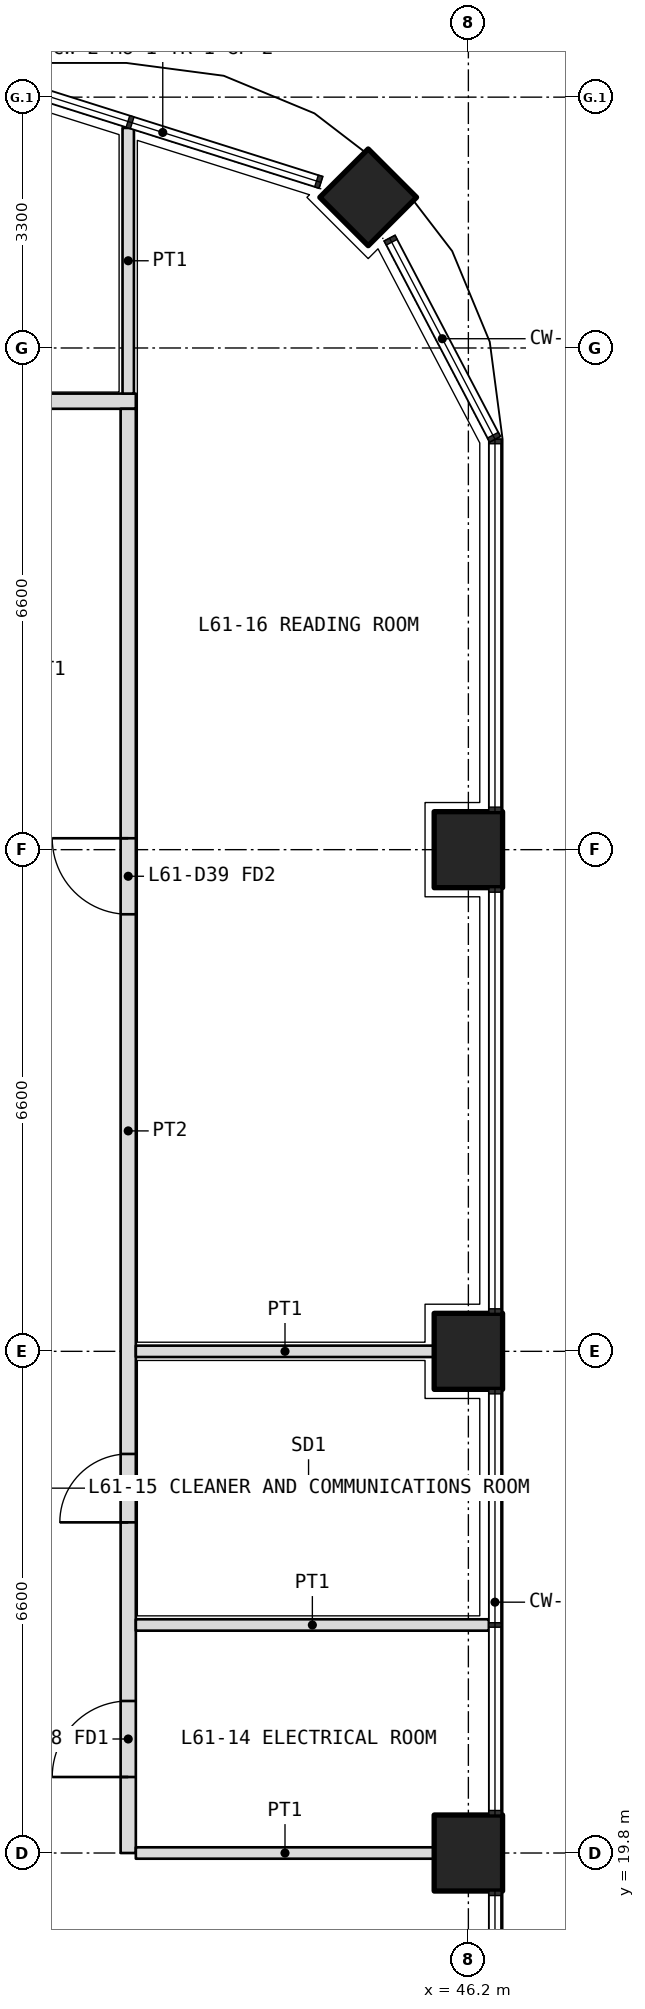
"""IFC4 building model, lengths in metres.
Left out: names, types, materials, properties, quantities, classifications, styles, units other than length and angle.
Written with IfcOpenShell. Run it as: python <this file> out.ifc"""

import sys

from ifc_helpers import new_model, si_unit, direction, frame, frame_2d, origin, origin_2d, place, context, subcontext, project, spatial, rectangle, extrude, element, fill, save


model = new_model("IFC4")
c1 = context("Model", 3, precision=1e-05, world=origin(), true_north=direction((0.0, 1.0)))
c2 = subcontext(c1, "Body", "Model", "MODEL_VIEW")
j1 = project(units=[si_unit("LENGTHUNIT", "METRE"), si_unit("PLANEANGLEUNIT", "RADIAN")], contexts=[c1])
p1 = place(None, origin())
s1 = spatial("IfcSite", under=j1, at=p1, CompositionType="ELEMENT")
p2 = place(p1, origin())
s2 = spatial("IfcBuilding", under=s1, at=p2, CompositionType="ELEMENT")
p3 = place(p2, frame((0.0, 0.0, 267.0)))
s3 = spatial("IfcBuildingStorey", under=s2, at=p3, CompositionType="ELEMENT", Elevation=267.0)
p4 = place(p3, frame((44.882, 41.582, 0.0), z_axis=(0.0, 0.0, 1.0), x_axis=(0.707106781187, 0.707106781187, 0.0)))
e1 = element("IfcColumn", 1, at=p4, inside=s3, PredefinedType="COLUMN", context=c2, shape_type="SweptSolid", body=[
    extrude(rectangle(XDim=0.9, YDim=0.9, at=origin_2d()), origin(), (0.0, 0.0, 1.0), 4.2),
])
for number, where, z_axis, x_axis in (
    (2, (46.2, 19.8, 0.0), (0.0, 0.0, 1.0), (0.0, 1.0, 0.0)),
    (3, (46.2, 26.4, 0.0), (0.0, 0.0, 1.0), (0.0, 1.0, 0.0)),
    (4, (46.2, 33.0, 0.0), (0.0, 0.0, 1.0), (0.0, 1.0, 0.0)),
):
    element("IfcColumn", number, at=place(p3, frame(where, z_axis=z_axis, x_axis=x_axis)), inside=s3, PredefinedType="COLUMN", context=c2, shape_type="SweptSolid", body=[
        extrude(rectangle(XDim=1.0, YDim=0.9, at=origin_2d()), origin(), (0.0, 0.0, 1.0), 4.2),
    ])
p5 = place(p3, frame((10.975, 38.9, 0.0), z_axis=(0.0, 0.0, 1.0), x_axis=(1.0, 0.0, 0.0)))
e5 = element("IfcWall", 5, at=p5, inside=s3, PredefinedType="PARTITIONING", context=c2, shape_type="SweptSolid", body=[
    extrude(rectangle(XDim=30.85, YDim=0.2, at=frame_2d((15.425, 0.0))), origin(), (0.0, 0.0, 1.0), 3.0),
])
p6 = place(p5, frame((0.663, 0.0, 0.0)))
e6 = element("IfcOpeningElement", 6, at=p6, cuts=e5, PredefinedType="OPENING", context=c2, shape_type="SweptSolid", body=[
    extrude(rectangle(XDim=1.0, YDim=2.1, at=frame_2d((0.5, 1.05))), frame((0.0, 0.11, 0.0), z_axis=(0.0, -1.0, 0.0), x_axis=(1.0, 0.0, 0.0)), (0.0, 0.0, 1.0), 0.22),
])
p7 = place(p5, frame((3.375, 0.0, 0.0)))
e7 = element("IfcOpeningElement", 7, at=p7, cuts=e5, PredefinedType="OPENING", context=c2, shape_type="SweptSolid", body=[
    extrude(rectangle(XDim=1.0, YDim=2.1, at=frame_2d((0.5, 1.05))), frame((0.0, 0.11, 0.0), z_axis=(0.0, -1.0, 0.0), x_axis=(1.0, 0.0, 0.0)), (0.0, 0.0, 1.0), 0.22),
])
p8 = place(p5, frame((8.325, 0.0, 0.0)))
e8 = element("IfcOpeningElement", 8, at=p8, cuts=e5, PredefinedType="OPENING", context=c2, shape_type="SweptSolid", body=[
    extrude(rectangle(XDim=1.0, YDim=2.1, at=frame_2d((0.5, 1.05))), frame((0.0, 0.11, 0.0), z_axis=(0.0, -1.0, 0.0), x_axis=(1.0, 0.0, 0.0)), (0.0, 0.0, 1.0), 0.22),
])
p9 = place(p5, frame((13.275, 0.0, 0.0)))
e9 = element("IfcOpeningElement", 9, at=p9, cuts=e5, PredefinedType="OPENING", context=c2, shape_type="SweptSolid", body=[
    extrude(rectangle(XDim=1.0, YDim=2.1, at=frame_2d((0.5, 1.05))), frame((0.0, 0.11, 0.0), z_axis=(0.0, -1.0, 0.0), x_axis=(1.0, 0.0, 0.0)), (0.0, 0.0, 1.0), 0.22),
])
p10 = place(p5, frame((22.587, 0.0, 0.0)))
e10 = element("IfcOpeningElement", 10, at=p10, cuts=e5, PredefinedType="OPENING", context=c2, shape_type="SweptSolid", body=[
    extrude(rectangle(XDim=1.0, YDim=2.1, at=frame_2d((0.5, 1.05))), frame((0.0, 0.11, 0.0), z_axis=(0.0, -1.0, 0.0), x_axis=(1.0, 0.0, 0.0)), (0.0, 0.0, 1.0), 0.22),
])
p11 = place(p3, frame((41.725, 19.8, 0.0), z_axis=(0.0, 0.0, 1.0), x_axis=(0.0, 1.0, 0.0)))
e11 = element("IfcWall", 11, at=p11, inside=s3, PredefinedType="PARTITIONING", context=c2, shape_type="SweptSolid", body=[
    extrude(rectangle(XDim=19.0, YDim=0.2, at=frame_2d((9.5, 0.0))), origin(), (0.0, 0.0, 1.0), 3.0),
])
p12 = place(p11, frame((1.0, 0.0, 0.0)))
e12 = element("IfcOpeningElement", 12, at=p12, cuts=e11, PredefinedType="OPENING", context=c2, shape_type="SweptSolid", body=[
    extrude(rectangle(XDim=1.0, YDim=2.1, at=frame_2d((0.5, 1.05))), frame((0.0, 0.11, 0.0), z_axis=(0.0, -1.0, 0.0), x_axis=(1.0, 0.0, 0.0)), (0.0, 0.0, 1.0), 0.22),
])
p13 = place(p11, frame((4.35, 0.0, 0.0)))
e13 = element("IfcOpeningElement", 13, at=p13, cuts=e11, PredefinedType="OPENING", context=c2, shape_type="SweptSolid", body=[
    extrude(rectangle(XDim=0.9, YDim=2.1, at=frame_2d((0.45, 1.05))), frame((0.0, 0.11, 0.0), z_axis=(0.0, -1.0, 0.0), x_axis=(1.0, 0.0, 0.0)), (0.0, 0.0, 1.0), 0.22),
])
p14 = place(p11, frame((12.35, 0.0, 0.0)))
e14 = element("IfcOpeningElement", 14, at=p14, cuts=e11, PredefinedType="OPENING", context=c2, shape_type="SweptSolid", body=[
    extrude(rectangle(XDim=1.0, YDim=2.1, at=frame_2d((0.5, 1.05))), frame((0.0, 0.11, 0.0), z_axis=(0.0, -1.0, 0.0), x_axis=(1.0, 0.0, 0.0)), (0.0, 0.0, 1.0), 0.22),
])
p15 = place(p3, frame((41.725, 42.495, 0.0), z_axis=(0.0, 0.0, 1.0), x_axis=(0.0, -1.0, 0.0)))
e15 = element("IfcWall", 15, at=p15, inside=s3, PredefinedType="PARTITIONING", context=c2, shape_type="SweptSolid", body=[
    extrude(rectangle(XDim=3.495, YDim=0.15, at=frame_2d((1.748, 0.0))), origin(), (0.0, 0.0, 1.0), 2.7),
])
p16 = place(p3, frame((46.47, 22.8, 0.0), z_axis=(0.0, 0.0, 1.0), x_axis=(-1.0, 0.0, 0.0)))
e16 = element("IfcWall", 16, at=p16, inside=s3, PredefinedType="PARTITIONING", context=c2, shape_type="SweptSolid", body=[
    extrude(rectangle(XDim=4.645, YDim=0.15, at=frame_2d((2.323, 0.0))), origin(), (0.0, 0.0, 1.0), 2.7),
])
for number, where, z_axis, x_axis in (
    (17, (45.75, 26.4, 0.0), (0.0, 0.0, 1.0), (-1.0, 0.0, 0.0)),
    (18, (45.75, 19.8, 0.0), (0.0, 0.0, 1.0), (-1.0, 0.0, 0.0)),
):
    element("IfcWall", number, at=place(p3, frame(where, z_axis=z_axis, x_axis=x_axis)), inside=s3, PredefinedType="PARTITIONING", context=c2, shape_type="SweptSolid", body=[
        extrude(rectangle(XDim=3.925, YDim=0.15, at=frame_2d((1.962, 0.0))), origin(), (0.0, 0.0, 1.0), 3.0),
    ])
p17 = place(p12, origin())
e19 = element("IfcDoor", 19, at=p17, inside=s3, OperationType="SINGLE_SWING_LEFT", PredefinedType="DOOR", context=c2, shape_type="SweptSolid", body=[
    extrude(rectangle(XDim=1.0, YDim=2.1, at=frame_2d((0.5, 1.05))), frame((0.0, 0.025, 0.0), z_axis=(0.0, -1.0, 0.0), x_axis=(1.0, 0.0, 0.0)), (0.0, 0.0, 1.0), 0.05),
])
fill(e12, e19)
p18 = place(p13, origin())
e20 = element("IfcDoor", 20, at=p18, inside=s3, OperationType="SINGLE_SWING_LEFT", PredefinedType="DOOR", context=c2, shape_type="SweptSolid", body=[
    extrude(rectangle(XDim=0.9, YDim=2.1, at=frame_2d((0.45, 1.05))), frame((0.0, 0.025, 0.0), z_axis=(0.0, -1.0, 0.0), x_axis=(1.0, 0.0, 0.0)), (0.0, 0.0, 1.0), 0.05),
])
fill(e13, e20)
p19 = place(p14, origin())
e21 = element("IfcDoor", 21, at=p19, inside=s3, OperationType="SINGLE_SWING_RIGHT", PredefinedType="DOOR", context=c2, shape_type="SweptSolid", body=[
    extrude(rectangle(XDim=1.0, YDim=2.1, at=frame_2d((0.5, 1.05))), frame((0.0, 0.025, 0.0), z_axis=(0.0, -1.0, 0.0), x_axis=(1.0, 0.0, 0.0)), (0.0, 0.0, 1.0), 0.05),
])
fill(e14, e21)
save(model, sys.argv[1])
